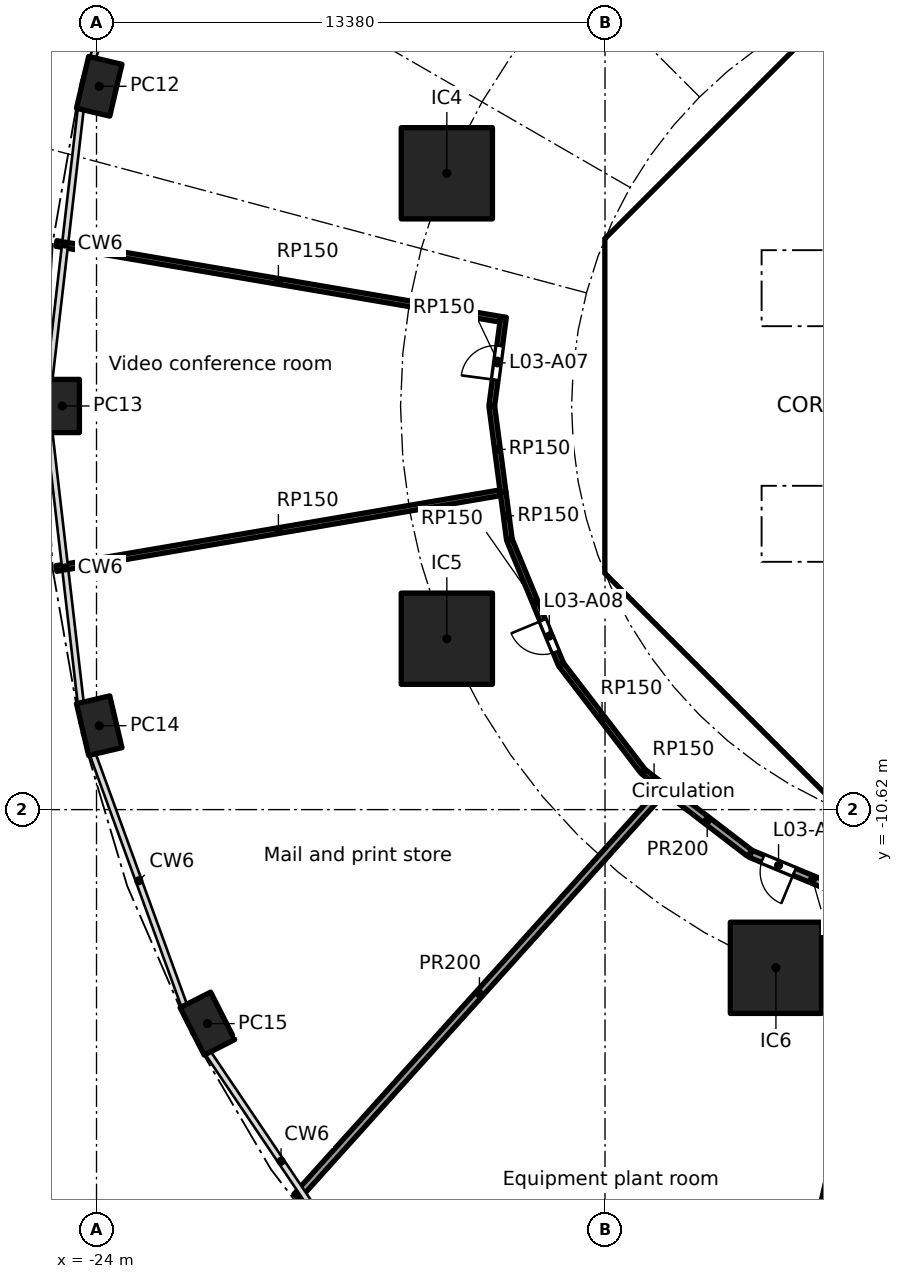
"""IFC4 building model, lengths in metres.
Left out: names, types, materials, properties, quantities, classifications, styles, units other than length and angle.
Written with IfcOpenShell. Run it as: python <this file> out.ifc"""

import sys

from ifc_helpers import new_model, si_unit, direction, frame, frame_2d, origin, origin_2d, place, context, subcontext, project, spatial, polyline, rectangle, hollow_rectangle, outline, extrude, element, fill, save


model = new_model("IFC4")
c1 = context("Model", 3, precision=1e-05, world=origin(), true_north=direction((0.0, 1.0)))
c2 = subcontext(c1, "Body", "Model", "MODEL_VIEW")
j1 = project(units=[si_unit("LENGTHUNIT", "METRE"), si_unit("PLANEANGLEUNIT", "RADIAN")], contexts=[c1])
p1 = place(None, origin())
s1 = spatial("IfcSite", under=j1, at=p1, CompositionType="ELEMENT")
p2 = place(p1, origin())
s2 = spatial("IfcBuilding", under=s1, at=p2, CompositionType="ELEMENT")
p3 = place(p2, frame((0.0, 0.0, 17.0)))
s3 = spatial("IfcBuildingStorey", under=s2, at=p3, CompositionType="ELEMENT", Elevation=17.0)
for number, where, z_axis, x_axis in (
    (1, (-23.929, 8.412, 0.0), (0.0, 0.0, 1.0), (-0.229, -0.973, 0.0)),
    (2, (-24.9, 0.0, 0.0), (0.0, 0.0, 1.0), (0.0, -1.0, 0.0)),
    (3, (-23.929, -8.412, 0.0), (0.0, 0.0, 1.0), (0.229, -0.973, 0.0)),
    (4, (-21.082, -16.25, 0.0), (0.0, 0.0, 1.0), (0.452, -0.892, 0.0)),
):
    element("IfcColumn", number, at=place(p3, frame(where, z_axis=z_axis, x_axis=x_axis)), inside=s3, PredefinedType="COLUMN", context=c2, shape_type="SweptSolid", body=[
        extrude(hollow_rectangle(XDim=1.4, YDim=0.9, WallThickness=0.05, at=origin_2d()), origin(), (0.0, 0.0, 1.0), 5.0),
    ])
for number, where, z_axis, x_axis in (
    (5, (-14.782, 6.123, 0.0), (0.0, 0.0, 1.0), (1.0, 0.0, 0.0)),
    (6, (-14.782, -6.123, 0.0), (0.0, 0.0, 1.0), (1.0, 0.0, 0.0)),
    (7, (-6.123, -14.782, 0.0), (0.0, 0.0, 1.0), (1.0, 0.0, 0.0)),
):
    element("IfcColumn", number, at=place(p3, frame(where, z_axis=z_axis, x_axis=x_axis)), inside=s3, PredefinedType="COLUMN", context=c2, shape_type="SweptSolid", body=[
        extrude(rectangle(XDim=2.4, YDim=2.4, at=origin_2d()), origin(), (0.0, 0.0, 1.0), 5.0),
    ])
p4 = place(p3, frame((-4.613, 9.988, 0.0), z_axis=(0.0, 0.0, 1.0), x_axis=(-0.707106781187, -0.707106781187, 0.0)))
e8 = element("IfcWall", 8, at=p4, inside=s3, PredefinedType="SHEAR", context=c2, shape_type="SweptSolid", body=[
    extrude(rectangle(XDim=7.602, YDim=0.6, at=frame_2d((3.801, 0.0))), origin(), (0.0, 0.0, 1.0), 4.7),
])
p5 = place(p4, frame((0.351, 0.0, 0.0)))
e9 = element("IfcOpeningElement", 9, at=p5, cuts=e8, PredefinedType="OPENING", context=c2, shape_type="SweptSolid", body=[
    extrude(rectangle(XDim=1.1, YDim=2.1, at=frame_2d((0.55, 1.05))), frame((0.0, 0.31, 0.0), z_axis=(0.0, -1.0, 0.0), x_axis=(1.0, 0.0, 0.0)), (0.0, 0.0, 1.0), 0.62),
])
p6 = place(p3, frame((-10.325, 3.801, 0.0), z_axis=(0.0, 0.0, 1.0), x_axis=(0.0, -1.0, 0.0)))
e10 = element("IfcWall", 10, at=p6, inside=s3, PredefinedType="SHEAR", context=c2, shape_type="SweptSolid", body=[
    extrude(rectangle(XDim=7.602, YDim=0.6, at=frame_2d((3.801, 0.0))), origin(), (0.0, 0.0, 1.0), 4.7),
])
p7 = place(p6, frame((0.651, 0.0, 0.0)))
e11 = element("IfcOpeningElement", 11, at=p7, cuts=e10, PredefinedType="OPENING", context=c2, shape_type="SweptSolid", body=[
    extrude(rectangle(XDim=1.5, YDim=2.1, at=frame_2d((0.75, 1.05))), frame((0.0, 0.31, 0.0), z_axis=(0.0, -1.0, 0.0), x_axis=(1.0, 0.0, 0.0)), (0.0, 0.0, 1.0), 0.62),
])
p8 = place(p6, frame((5.451, 0.0, 0.0)))
e12 = element("IfcOpeningElement", 12, at=p8, cuts=e10, PredefinedType="OPENING", context=c2, shape_type="SweptSolid", body=[
    extrude(rectangle(XDim=1.5, YDim=2.1, at=frame_2d((0.75, 1.05))), frame((0.0, 0.31, 0.0), z_axis=(0.0, -1.0, 0.0), x_axis=(1.0, 0.0, 0.0)), (0.0, 0.0, 1.0), 0.62),
])
p9 = place(p3, frame((-9.988, -4.613, 0.0), z_axis=(0.0, 0.0, 1.0), x_axis=(0.707106781187, -0.707106781187, 0.0)))
e13 = element("IfcWall", 13, at=p9, inside=s3, PredefinedType="SHEAR", context=c2, shape_type="SweptSolid", body=[
    extrude(rectangle(XDim=7.602, YDim=0.6, at=frame_2d((3.801, 0.0))), origin(), (0.0, 0.0, 1.0), 4.7),
])
p10 = place(p9, frame((6.151, 0.0, 0.0)))
e14 = element("IfcOpeningElement", 14, at=p10, cuts=e13, PredefinedType="OPENING", context=c2, shape_type="SweptSolid", body=[
    extrude(rectangle(XDim=1.1, YDim=2.1, at=frame_2d((0.55, 1.05))), frame((0.0, 0.31, 0.0), z_axis=(0.0, -1.0, 0.0), x_axis=(1.0, 0.0, 0.0)), (0.0, 0.0, 1.0), 0.62),
])
p11 = place(p3, frame((-5.8, 4.3, 0.0), z_axis=(0.0, 0.0, 1.0), x_axis=(0.0, 1.0, 0.0)))
e15 = element("IfcWall", 15, at=p11, inside=s3, PredefinedType="PARTITIONING", context=c2, shape_type="SweptSolid", body=[
    extrude(rectangle(XDim=3.927, YDim=0.15, at=frame_2d((1.963, 0.0))), origin(), (0.0, 0.0, 1.0), 4.7),
])
p12 = place(p11, frame((1.551, 0.0, 0.0)))
e16 = element("IfcOpeningElement", 16, at=p12, cuts=e15, PredefinedType="OPENING", context=c2, shape_type="SweptSolid", body=[
    extrude(rectangle(XDim=0.9, YDim=2.1, at=frame_2d((0.45, 1.05))), frame((0.0, 0.085, 0.0), z_axis=(0.0, -1.0, 0.0), x_axis=(1.0, 0.0, 0.0)), (0.0, 0.0, 1.0), 0.17),
])
p13 = place(p3, frame((-6.7, 2.0, 0.0), z_axis=(0.0, 0.0, 1.0), x_axis=(1.0, 0.0, 0.0)))
e17 = element("IfcWall", 17, at=p13, inside=s3, PredefinedType="SOLIDWALL", context=c2, shape_type="SweptSolid", body=[
    extrude(rectangle(XDim=13.4, YDim=0.2, at=frame_2d((6.7, 0.0))), origin(), (0.0, 0.0, 1.0), 4.7),
])
p14 = place(p13, frame((0.65, 0.0, 0.0)))
e18 = element("IfcOpeningElement", 18, at=p14, cuts=e17, PredefinedType="OPENING", context=c2, shape_type="SweptSolid", body=[
    extrude(rectangle(XDim=1.1, YDim=2.1, at=frame_2d((0.55, 1.05))), frame((0.0, 0.11, 0.0), z_axis=(0.0, -1.0, 0.0), x_axis=(1.0, 0.0, 0.0)), (0.0, 0.0, 1.0), 0.22),
])
p15 = place(p13, frame((2.85, 0.0, 0.0)))
e19 = element("IfcOpeningElement", 19, at=p15, cuts=e17, PredefinedType="OPENING", context=c2, shape_type="SweptSolid", body=[
    extrude(rectangle(XDim=1.1, YDim=2.1, at=frame_2d((0.55, 1.05))), frame((0.0, 0.11, 0.0), z_axis=(0.0, -1.0, 0.0), x_axis=(1.0, 0.0, 0.0)), (0.0, 0.0, 1.0), 0.22),
])
p16 = place(p13, frame((5.05, 0.0, 0.0)))
e20 = element("IfcOpeningElement", 20, at=p16, cuts=e17, PredefinedType="OPENING", context=c2, shape_type="SweptSolid", body=[
    extrude(rectangle(XDim=1.1, YDim=2.1, at=frame_2d((0.55, 1.05))), frame((0.0, 0.11, 0.0), z_axis=(0.0, -1.0, 0.0), x_axis=(1.0, 0.0, 0.0)), (0.0, 0.0, 1.0), 0.22),
])
p17 = place(p3, frame((-5.8, -8.227, 0.0), z_axis=(0.0, 0.0, 1.0), x_axis=(0.0, 1.0, 0.0)))
e21 = element("IfcWall", 21, at=p17, inside=s3, PredefinedType="PARTITIONING", context=c2, shape_type="SweptSolid", body=[
    extrude(rectangle(XDim=3.927, YDim=0.15, at=frame_2d((1.963, 0.0))), origin(), (0.0, 0.0, 1.0), 4.7),
])
p18 = place(p17, frame((1.476, 0.0, 0.0)))
e22 = element("IfcOpeningElement", 22, at=p18, cuts=e21, PredefinedType="OPENING", context=c2, shape_type="SweptSolid", body=[
    extrude(rectangle(XDim=0.9, YDim=2.1, at=frame_2d((0.45, 1.05))), frame((0.0, 0.085, 0.0), z_axis=(0.0, -1.0, 0.0), x_axis=(1.0, 0.0, 0.0)), (0.0, 0.0, 1.0), 0.17),
])
p19 = place(p3, frame((-6.7, -2.0, 0.0), z_axis=(0.0, 0.0, 1.0), x_axis=(1.0, 0.0, 0.0)))
e23 = element("IfcWall", 23, at=p19, inside=s3, PredefinedType="SOLIDWALL", context=c2, shape_type="SweptSolid", body=[
    extrude(rectangle(XDim=13.4, YDim=0.2, at=frame_2d((6.7, 0.0))), origin(), (0.0, 0.0, 1.0), 4.7),
])
p20 = place(p19, frame((0.65, 0.0, 0.0)))
e24 = element("IfcOpeningElement", 24, at=p20, cuts=e23, PredefinedType="OPENING", context=c2, shape_type="SweptSolid", body=[
    extrude(rectangle(XDim=1.1, YDim=2.1, at=frame_2d((0.55, 1.05))), frame((0.0, 0.11, 0.0), z_axis=(0.0, -1.0, 0.0), x_axis=(1.0, 0.0, 0.0)), (0.0, 0.0, 1.0), 0.22),
])
p21 = place(p19, frame((2.85, 0.0, 0.0)))
e25 = element("IfcOpeningElement", 25, at=p21, cuts=e23, PredefinedType="OPENING", context=c2, shape_type="SweptSolid", body=[
    extrude(rectangle(XDim=1.1, YDim=2.1, at=frame_2d((0.55, 1.05))), frame((0.0, 0.11, 0.0), z_axis=(0.0, -1.0, 0.0), x_axis=(1.0, 0.0, 0.0)), (0.0, 0.0, 1.0), 0.22),
])
p22 = place(p3, origin())
e26 = element("IfcWall", 26, at=p22, inside=s3, PredefinedType="SHEAR", context=c2, shape_type="SweptSolid", body=[
    extrude(outline(polyline([(-10.625, -3.801), (-10.025, -3.801), (-10.025, -4.152), (-9.776, -4.401), (-10.2, -4.825), (-10.625, -4.401), (-10.625, -3.801)])), origin(), (0.0, 0.0, 1.0), 4.7),
])
p23 = place(p3, origin())
e27 = element("IfcWall", 27, at=p23, inside=s3, PredefinedType="SHEAR", context=c2, shape_type="SweptSolid", body=[
    extrude(outline(polyline([(-10.2, 4.825), (-9.776, 4.401), (-10.025, 4.152), (-10.025, 3.801), (-10.625, 3.801), (-10.625, 4.401), (-10.2, 4.825)])), origin(), (0.0, 0.0, 1.0), 4.7),
])
p24 = place(p3, origin())
e28 = element("IfcWall", 28, at=p24, inside=s3, PredefinedType="SOLIDWALL", context=c2, shape_type="SweptSolid", body=[
    extrude(outline(polyline([(-6.7, -2.1), (-6.5, -2.1), (-6.5, -4.1), (-4.5, -4.1), (-4.5, -2.1), (-4.3, -2.1), (-4.3, -4.1), (-2.3, -4.1), (-2.3, -2.1), (-2.1, -2.1), (-2.1, -4.1), (-0.1, -4.1), (-0.1, -2.1), (0.1, -2.1), (0.1, -4.1), (2.1, -4.1), (2.1, -2.1), (2.3, -2.1), (2.3, -4.1), (4.3, -4.1), (4.3, -2.1), (4.5, -2.1), (4.5, -4.1), (6.5, -4.1), (6.5, -2.1), (6.7, -2.1), (6.7, -4.3), (-6.7, -4.3), (-6.7, -2.1)])), origin(), (0.0, 0.0, 1.0), 4.7),
])
p25 = place(p3, origin())
e29 = element("IfcWall", 29, at=p25, inside=s3, PredefinedType="SOLIDWALL", context=c2, shape_type="SweptSolid", body=[
    extrude(outline(polyline([(-6.5, 2.1), (-6.7, 2.1), (-6.7, 4.3), (6.7, 4.3), (6.7, 2.1), (6.5, 2.1), (6.5, 4.1), (4.5, 4.1), (4.5, 2.1), (4.3, 2.1), (4.3, 4.1), (2.3, 4.1), (2.3, 2.1), (2.1, 2.1), (2.1, 4.1), (0.1, 4.1), (0.1, 2.1), (-0.1, 2.1), (-0.1, 4.1), (-2.1, 4.1), (-2.1, 2.1), (-2.3, 2.1), (-2.3, 4.1), (-4.3, 4.1), (-4.3, 2.1), (-4.5, 2.1), (-4.5, 4.1), (-6.5, 4.1), (-6.5, 2.1)])), origin(), (0.0, 0.0, 1.0), 4.7),
])
for number, where, z_axis, x_axis in (
    (30, (-10.025, -4.0, 0.0), (0.0, 0.0, 1.0), (1.0, 0.0, 0.0)),
    (31, (-10.025, 4.0, 0.0), (0.0, 0.0, 1.0), (1.0, 0.0, 0.0)),
):
    element("IfcWall", number, at=place(p3, frame(where, z_axis=z_axis, x_axis=x_axis)), inside=s3, PredefinedType="PARTITIONING", context=c2, shape_type="SweptSolid", body=[
        extrude(rectangle(XDim=3.325, YDim=0.2, at=frame_2d((1.662, 0.0))), origin(), (0.0, 0.0, 1.0), 4.7),
    ])
p26 = place(p3, frame((-13.598, 0.012, 0.0), z_axis=(0.0, 0.0, 1.0), x_axis=(0.130443774898, 0.991455708335, 0.0)))
e32 = element("IfcWall", 32, at=p26, inside=s3, PredefinedType="PARTITIONING", context=c2, shape_type="SweptSolid", body=[
    extrude(rectangle(XDim=2.353, YDim=0.15, at=frame_2d((1.176, 0.0))), origin(), (0.0, 0.0, 1.0), 4.7),
])
p27 = place(p26, frame((0.683, 0.0, 0.0)))
e33 = element("IfcOpeningElement", 33, at=p27, cuts=e32, PredefinedType="OPENING", context=c2, shape_type="SweptSolid", body=[
    extrude(rectangle(XDim=0.9, YDim=2.1, at=frame_2d((0.45, 1.05))), frame((0.0, 0.085, 0.0), z_axis=(0.0, -1.0, 0.0), x_axis=(1.0, 0.0, 0.0)), (0.0, 0.0, 1.0), 0.17),
])
p28 = place(p3, frame((-13.375, -2.282, 0.0), z_axis=(0.0, 0.0, 1.0), x_axis=(-0.985753347153, -0.168197320361, 0.0)))
e34 = element("IfcWall", 34, at=p28, inside=s3, PredefinedType="PARTITIONING", context=c2, shape_type="SweptSolid", body=[
    extrude(rectangle(XDim=11.847, YDim=0.15, at=frame_2d((5.924, 0.0))), origin(), (0.0, 0.0, 1.0), 4.7),
])
p29 = place(p3, frame((-13.301, -2.27, 0.0), z_axis=(0.0, 0.0, 1.0), x_axis=(-0.130457285505, 0.991453930679, 0.0)))
e35 = element("IfcWall", 35, at=p29, inside=s3, PredefinedType="PARTITIONING", context=c2, shape_type="SweptSolid", body=[
    extrude(rectangle(XDim=2.278, YDim=0.15, at=frame_2d((1.139, 0.0))), origin(), (0.0, 0.0, 1.0), 4.7),
])
p30 = place(p3, frame((-13.375, 2.282, 0.0), z_axis=(0.0, 0.0, 1.0), x_axis=(-0.985753347153, 0.168197320361, 0.0)))
e36 = element("IfcWall", 36, at=p30, inside=s3, PredefinedType="PARTITIONING", context=c2, shape_type="SweptSolid", body=[
    extrude(rectangle(XDim=11.847, YDim=0.15, at=frame_2d((5.924, 0.0))), origin(), (0.0, 0.0, 1.0), 4.7),
])
p31 = place(p3, frame((-13.138, -3.508, 0.0), z_axis=(0.0, 0.0, 1.0), x_axis=(-0.130575867104, 0.991438320285, 0.0)))
e37 = element("IfcWall", 37, at=p31, inside=s3, PredefinedType="PARTITIONING", context=c2, shape_type="SweptSolid", body=[
    extrude(rectangle(XDim=1.249, YDim=0.15, at=frame_2d((0.625, 0.0))), origin(), (0.0, 0.0, 1.0), 4.7),
])
p32 = place(p3, frame((-11.782, -6.789, 0.0), z_axis=(0.0, 0.0, 1.0), x_axis=(-0.382677866108, 0.923881838111, 0.0)))
e38 = element("IfcWall", 38, at=p32, inside=s3, PredefinedType="PARTITIONING", context=c2, shape_type="SweptSolid", body=[
    extrude(rectangle(XDim=3.527, YDim=0.15, at=frame_2d((1.763, 0.0))), origin(), (0.0, 0.0, 1.0), 4.7),
])
p33 = place(p32, frame((0.346, 0.0, 0.0)))
e39 = element("IfcOpeningElement", 39, at=p33, cuts=e38, PredefinedType="OPENING", context=c2, shape_type="SweptSolid", body=[
    extrude(rectangle(XDim=0.9, YDim=2.1, at=frame_2d((0.45, 1.05))), frame((0.0, 0.085, 0.0), z_axis=(0.0, -1.0, 0.0), x_axis=(1.0, 0.0, 0.0)), (0.0, 0.0, 1.0), 0.17),
])
p34 = place(p3, frame((-9.624, -9.607, 0.0), z_axis=(0.0, 0.0, 1.0), x_axis=(-0.608736710054, 0.793372307201, 0.0)))
e40 = element("IfcWall", 40, at=p34, inside=s3, PredefinedType="PARTITIONING", context=c2, shape_type="SweptSolid", body=[
    extrude(rectangle(XDim=3.527, YDim=0.15, at=frame_2d((1.763, 0.0))), origin(), (0.0, 0.0, 1.0), 4.7),
])
p35 = place(p3, frame((-9.05, -10.051, 0.0), z_axis=(0.0, 0.0, 1.0), x_axis=(-0.793399175387, 0.608701690893, 0.0)))
e41 = element("IfcWall", 41, at=p35, inside=s3, PredefinedType="PARTITIONING", context=c2, shape_type="SweptSolid", body=[
    extrude(rectangle(XDim=0.702, YDim=0.15, at=frame_2d((0.351, 0.0))), origin(), (0.0, 0.0, 1.0), 4.7),
])
p36 = place(p3, frame((-9.117, -10.126, 0.0), z_axis=(0.0, 0.0, 1.0), x_axis=(-0.669127133422, -0.743147952509, 0.0)))
e42 = element("IfcWall", 42, at=p36, inside=s3, PredefinedType="PARTITIONING", context=c2, shape_type="SweptSolid", body=[
    extrude(rectangle(XDim=14.367, YDim=0.2, at=frame_2d((7.184, 0.0))), origin(), (0.0, 0.0, 1.0), 4.7),
])
p37 = place(p3, frame((-7.053, -30.552, 0.0), z_axis=(0.0, 0.0, 1.0), x_axis=(0.224939147882, 0.974372813532, 0.0)))
e43 = element("IfcWall", 43, at=p37, inside=s3, PredefinedType="PARTITIONING", context=c2, shape_type="SweptSolid", body=[
    extrude(rectangle(XDim=17.911, YDim=0.2, at=frame_2d((8.955, 0.0))), origin(), (0.0, 0.0, 1.0), 4.7),
])
p38 = place(p3, frame((-6.812, -11.769, 0.0), z_axis=(0.0, 0.0, 1.0), x_axis=(-0.793389024662, 0.608714921409, 0.0)))
e44 = element("IfcWall", 44, at=p38, inside=s3, PredefinedType="PARTITIONING", context=c2, shape_type="SweptSolid", body=[
    extrude(rectangle(XDim=2.821, YDim=0.2, at=frame_2d((1.411, 0.0))), origin(), (0.0, 0.0, 1.0), 4.7),
])
p39 = place(p3, frame((-3.534, -13.131, 0.0), z_axis=(0.0, 0.0, 1.0), x_axis=(-0.92386297064, 0.382723413813, 0.0)))
e45 = element("IfcWall", 45, at=p39, inside=s3, PredefinedType="PARTITIONING", context=c2, shape_type="SweptSolid", body=[
    extrude(rectangle(XDim=3.52, YDim=0.2, at=frame_2d((1.76, 0.0))), origin(), (0.0, 0.0, 1.0), 4.7),
])
p40 = place(p39, frame((2.278, 0.0, 0.0)))
e46 = element("IfcOpeningElement", 46, at=p40, cuts=e45, PredefinedType="OPENING", context=c2, shape_type="SweptSolid", body=[
    extrude(rectangle(XDim=0.9, YDim=2.1, at=frame_2d((0.45, 1.05))), frame((0.0, 0.11, 0.0), z_axis=(0.0, -1.0, 0.0), x_axis=(1.0, 0.0, 0.0)), (0.0, 0.0, 1.0), 0.22),
])
p41 = place(p14, origin())
e47 = element("IfcDoor", 47, at=p41, inside=s3, OperationType="DOUBLE_DOOR_SLIDING", PredefinedType="DOOR", context=c2, shape_type="SweptSolid", body=[
    extrude(rectangle(XDim=1.1, YDim=2.1, at=frame_2d((0.55, 1.05))), frame((0.0, 0.025, 0.0), z_axis=(0.0, -1.0, 0.0), x_axis=(1.0, 0.0, 0.0)), (0.0, 0.0, 1.0), 0.05),
])
fill(e18, e47)
p42 = place(p20, origin())
e48 = element("IfcDoor", 48, at=p42, inside=s3, OperationType="DOUBLE_DOOR_SLIDING", PredefinedType="DOOR", context=c2, shape_type="SweptSolid", body=[
    extrude(rectangle(XDim=1.1, YDim=2.1, at=frame_2d((0.55, 1.05))), frame((0.0, 0.025, 0.0), z_axis=(0.0, -1.0, 0.0), x_axis=(1.0, 0.0, 0.0)), (0.0, 0.0, 1.0), 0.05),
])
fill(e24, e48)
p43 = place(p12, origin())
e49 = element("IfcDoor", 49, at=p43, inside=s3, OperationType="SINGLE_SWING_RIGHT", PredefinedType="DOOR", context=c2, shape_type="SweptSolid", body=[
    extrude(rectangle(XDim=0.9, YDim=2.1, at=frame_2d((0.45, 1.05))), frame((0.0, 0.025, 0.0), z_axis=(0.0, -1.0, 0.0), x_axis=(1.0, 0.0, 0.0)), (0.0, 0.0, 1.0), 0.05),
])
fill(e16, e49)
p44 = place(p18, origin())
e50 = element("IfcDoor", 50, at=p44, inside=s3, OperationType="SINGLE_SWING_RIGHT", PredefinedType="DOOR", context=c2, shape_type="SweptSolid", body=[
    extrude(rectangle(XDim=0.9, YDim=2.1, at=frame_2d((0.45, 1.05))), frame((0.0, 0.025, 0.0), z_axis=(0.0, -1.0, 0.0), x_axis=(1.0, 0.0, 0.0)), (0.0, 0.0, 1.0), 0.05),
])
fill(e22, e50)
p45 = place(p7, origin())
e51 = element("IfcDoor", 51, at=p45, inside=s3, OperationType="DOUBLE_DOOR_SINGLE_SWING", PredefinedType="DOOR", context=c2, shape_type="SweptSolid", body=[
    extrude(rectangle(XDim=1.5, YDim=2.1, at=frame_2d((0.75, 1.05))), frame((0.0, 0.025, 0.0), z_axis=(0.0, -1.0, 0.0), x_axis=(1.0, 0.0, 0.0)), (0.0, 0.0, 1.0), 0.05),
])
fill(e11, e51)
p46 = place(p8, origin())
e52 = element("IfcDoor", 52, at=p46, inside=s3, OperationType="DOUBLE_DOOR_SINGLE_SWING", PredefinedType="DOOR", context=c2, shape_type="SweptSolid", body=[
    extrude(rectangle(XDim=1.5, YDim=2.1, at=frame_2d((0.75, 1.05))), frame((0.0, 0.025, 0.0), z_axis=(0.0, -1.0, 0.0), x_axis=(1.0, 0.0, 0.0)), (0.0, 0.0, 1.0), 0.05),
])
fill(e12, e52)
p47 = place(p5, origin())
e53 = element("IfcDoor", 53, at=p47, inside=s3, OperationType="SINGLE_SWING_RIGHT", PredefinedType="DOOR", context=c2, shape_type="SweptSolid", body=[
    extrude(rectangle(XDim=1.1, YDim=2.1, at=frame_2d((0.55, 1.05))), frame((0.0, 0.025, 0.0), z_axis=(0.0, -1.0, 0.0), x_axis=(1.0, 0.0, 0.0)), (0.0, 0.0, 1.0), 0.05),
])
fill(e9, e53)
p48 = place(p10, origin())
e54 = element("IfcDoor", 54, at=p48, inside=s3, OperationType="SINGLE_SWING_RIGHT", PredefinedType="DOOR", context=c2, shape_type="SweptSolid", body=[
    extrude(rectangle(XDim=1.1, YDim=2.1, at=frame_2d((0.55, 1.05))), frame((0.0, 0.025, 0.0), z_axis=(0.0, -1.0, 0.0), x_axis=(1.0, 0.0, 0.0)), (0.0, 0.0, 1.0), 0.05),
])
fill(e14, e54)
p49 = place(p27, origin())
e55 = element("IfcDoor", 55, at=p49, inside=s3, OperationType="SINGLE_SWING_LEFT", PredefinedType="DOOR", context=c2, shape_type="SweptSolid", body=[
    extrude(rectangle(XDim=0.9, YDim=2.1, at=frame_2d((0.45, 1.05))), frame((0.0, 0.025, 0.0), z_axis=(0.0, -1.0, 0.0), x_axis=(1.0, 0.0, 0.0)), (0.0, 0.0, 1.0), 0.05),
])
fill(e33, e55)
p50 = place(p33, origin())
e56 = element("IfcDoor", 56, at=p50, inside=s3, OperationType="SINGLE_SWING_RIGHT", PredefinedType="DOOR", context=c2, shape_type="SweptSolid", body=[
    extrude(rectangle(XDim=0.9, YDim=2.1, at=frame_2d((0.45, 1.05))), frame((0.0, 0.025, 0.0), z_axis=(0.0, -1.0, 0.0), x_axis=(1.0, 0.0, 0.0)), (0.0, 0.0, 1.0), 0.05),
])
fill(e39, e56)
p51 = place(p40, origin())
e57 = element("IfcDoor", 57, at=p51, inside=s3, OperationType="SINGLE_SWING_LEFT", PredefinedType="DOOR", context=c2, shape_type="SweptSolid", body=[
    extrude(rectangle(XDim=0.9, YDim=2.1, at=frame_2d((0.45, 1.05))), frame((0.0, 0.025, 0.0), z_axis=(0.0, -1.0, 0.0), x_axis=(1.0, 0.0, 0.0)), (0.0, 0.0, 1.0), 0.05),
])
fill(e46, e57)
save(model, sys.argv[1])
